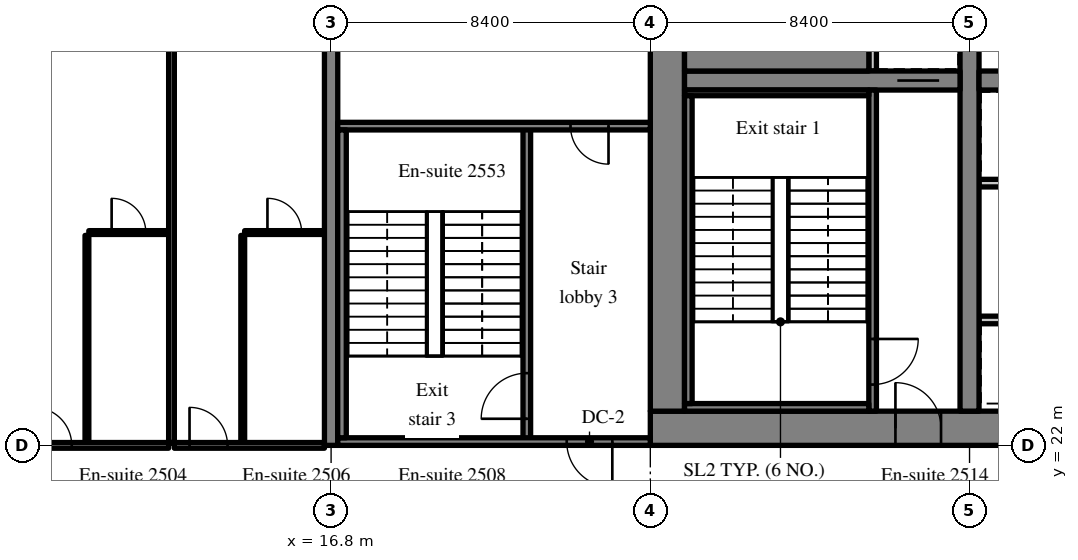
"""IFC4 building model, lengths in metres.
Left out: names, types, materials, properties, quantities, classifications, styles, units other than length and angle.
Written with IfcOpenShell. Run it as: python <this file> out.ifc"""

import sys

from ifc_helpers import new_model, si_unit, direction, frame, frame_2d, origin, place, context, subcontext, project, spatial, rectangle, extrude, source, transform, mapped, element, fill, save


model = new_model("IFC4")
c1 = context("Model", 3, precision=1e-05, world=origin(), true_north=direction((0.0, 1.0)))
c2 = subcontext(c1, "Body", "Model", "MODEL_VIEW")
j1 = project(units=[si_unit("LENGTHUNIT", "METRE"), si_unit("PLANEANGLEUNIT", "RADIAN")], contexts=[c1])
p1 = place(None, origin())
s1 = spatial("IfcSite", under=j1, at=p1, CompositionType="ELEMENT")
p2 = place(p1, origin())
s2 = spatial("IfcBuilding", under=s1, at=p2, CompositionType="ELEMENT")
p3 = place(p2, frame((0.0, 0.0, 106.6)))
s3 = spatial("IfcBuildingStorey", under=s2, at=p3, CompositionType="ELEMENT", Elevation=106.6)
m1 = source(origin(), c2, "Body", "SweptSolid", [
    extrude(rectangle(XDim=50.4, YDim=0.9, at=frame_2d((25.2, 0.0))), origin(), (0.0, 0.0, 1.0), 3.52),
])
p4 = place(p3, frame((25.2, 22.45, 0.0), z_axis=(0.0, 0.0, 1.0), x_axis=(1.0, 0.0, 0.0)))
e1 = element("IfcWall", 1, at=p4, inside=s3, PredefinedType="SHEAR", context=c2, shape_type="MappedRepresentation", body=[
    mapped(m1, transform((0.0, 0.0, 0.0), scale=1.0)),
])
m2 = source(origin(), c2, "Body", "SweptSolid", [
    extrude(rectangle(XDim=1.8, YDim=2.1, at=frame_2d((0.9, 1.05))), frame((0.0, 0.46, 0.0), z_axis=(0.0, -1.0, 0.0), x_axis=(1.0, 0.0, 0.0)), (0.0, 0.0, 1.0), 0.92),
])
p5 = place(p4, frame((15.9, 0.0, 0.0)))
e2 = element("IfcOpeningElement", 2, at=p5, cuts=e1, PredefinedType="OPENING", context=c2, shape_type="MappedRepresentation", body=[
    mapped(m2, transform((0.0, 0.0, 0.0), scale=1.0)),
])
m3 = source(origin(), c2, "Body", "SweptSolid", [
    extrude(rectangle(XDim=1.2, YDim=2.1, at=frame_2d((0.6, 1.05))), frame((0.0, 0.46, 0.0), z_axis=(0.0, -1.0, 0.0), x_axis=(1.0, 0.0, 0.0)), (0.0, 0.0, 1.0), 0.92),
])
p6 = place(p4, frame((26.975, 0.0, 0.0)))
e3 = element("IfcOpeningElement", 3, at=p6, cuts=e1, PredefinedType="OPENING", context=c2, shape_type="MappedRepresentation", body=[
    mapped(m3, transform((0.0, 0.0, 0.0), scale=1.0)),
])
m4 = source(origin(), c2, "Body", "SweptSolid", [
    extrude(rectangle(XDim=0.9, YDim=2.1, at=frame_2d((0.45, 1.05))), frame((0.0, 0.46, 0.0), z_axis=(0.0, -1.0, 0.0), x_axis=(1.0, 0.0, 0.0)), (0.0, 0.0, 1.0), 0.92),
])
p7 = place(p4, frame((32.25, 0.0, 0.0)))
e4 = element("IfcOpeningElement", 4, at=p7, cuts=e1, PredefinedType="OPENING", context=c2, shape_type="MappedRepresentation", body=[
    mapped(m4, transform((0.0, 0.0, 0.0), scale=1.0)),
])
p8 = place(p4, frame((38.275, 0.0, 0.0)))
e5 = element("IfcOpeningElement", 5, at=p8, cuts=e1, PredefinedType="OPENING", context=c2, shape_type="MappedRepresentation", body=[
    mapped(m4, transform((0.0, 0.0, 0.0), scale=1.0)),
])
p9 = place(p4, frame((6.45, 0.0, 0.0)))
e6 = element("IfcOpeningElement", 6, at=p9, cuts=e1, PredefinedType="OPENING", context=c2, shape_type="MappedRepresentation", body=[
    mapped(m3, transform((0.0, 0.0, 0.0), scale=1.0)),
])
p10 = place(p4, frame((47.775, 0.0, 0.0)))
e7 = element("IfcOpeningElement", 7, at=p10, cuts=e1, PredefinedType="OPENING", context=c2, shape_type="MappedRepresentation", body=[
    mapped(m3, transform((0.0, 0.0, 0.0), scale=1.0)),
])
m5 = source(origin(), c2, "Body", "SweptSolid", [
    extrude(rectangle(XDim=18.2, YDim=0.9, at=frame_2d((9.1, 0.0))), origin(), (0.0, 0.0, 1.0), 3.52),
])
p11 = place(p3, frame((25.65, 22.9, 0.0), z_axis=(0.0, 0.0, 1.0), x_axis=(0.0, 1.0, 0.0)))
e8 = element("IfcWall", 8, at=p11, inside=s3, PredefinedType="SHEAR", context=c2, shape_type="MappedRepresentation", body=[
    mapped(m5, transform((0.0, 0.0, 0.0), scale=1.0)),
])
m6 = source(origin(), c2, "Body", "SweptSolid", [
    extrude(rectangle(XDim=18.2, YDim=0.5, at=frame_2d((9.1, 0.0))), origin(), (0.0, 0.0, 1.0), 3.52),
])
p12 = place(p3, frame((33.6, 22.9, 0.0), z_axis=(0.0, 0.0, 1.0), x_axis=(0.0, 1.0, 0.0)))
e9 = element("IfcWall", 9, at=p12, inside=s3, PredefinedType="SHEAR", context=c2, shape_type="MappedRepresentation", body=[
    mapped(m6, transform((0.0, 0.0, 0.0), scale=1.0)),
])
m7 = source(origin(), c2, "Body", "SweptSolid", [
    extrude(rectangle(XDim=1.1, YDim=2.1, at=frame_2d((0.55, 1.05))), frame((0.0, 0.26, 0.0), z_axis=(0.0, -1.0, 0.0), x_axis=(1.0, 0.0, 0.0)), (0.0, 0.0, 1.0), 0.52),
])
p13 = place(p12, frame((12.55, 0.0, 0.0)))
e10 = element("IfcOpeningElement", 10, at=p13, cuts=e9, PredefinedType="OPENING", context=c2, shape_type="MappedRepresentation", body=[
    mapped(m7, transform((0.0, 0.0, 0.0), scale=1.0)),
])
m8 = source(origin(), c2, "Body", "SweptSolid", [
    extrude(rectangle(XDim=7.25, YDim=0.5, at=frame_2d((3.625, 0.0))), origin(), (0.0, 0.0, 1.0), 3.52),
])
p14 = place(p3, frame((26.1, 31.6, 0.0), z_axis=(0.0, 0.0, 1.0), x_axis=(1.0, 0.0, 0.0)))
e11 = element("IfcWall", 11, at=p14, inside=s3, PredefinedType="SHEAR", context=c2, shape_type="MappedRepresentation", body=[
    mapped(m8, transform((0.0, 0.0, 0.0), scale=1.0)),
])
p15 = place(p14, frame((5.6, 0.0, 0.0)))
e12 = element("IfcOpeningElement", 12, at=p15, cuts=e11, PredefinedType="OPENING", context=c2, shape_type="MappedRepresentation", body=[
    mapped(m7, transform((0.0, 0.0, 0.0), scale=1.0)),
])
m9 = source(origin(), c2, "Body", "SweptSolid", [
    extrude(rectangle(XDim=16.3, YDim=0.5, at=frame_2d((8.15, 0.0))), origin(), (0.0, 0.0, 1.0), 3.52),
])
p16 = place(p3, frame((33.85, 31.6, 0.0), z_axis=(0.0, 0.0, 1.0), x_axis=(1.0, 0.0, 0.0)))
e13 = element("IfcWall", 13, at=p16, inside=s3, PredefinedType="SHEAR", context=c2, shape_type="MappedRepresentation", body=[
    mapped(m9, transform((0.0, 0.0, 0.0), scale=1.0)),
])
m10 = source(origin(), c2, "Body", "SweptSolid", [
    extrude(rectangle(XDim=1.0, YDim=2.1, at=frame_2d((0.5, 1.05))), frame((0.0, 0.26, 0.0), z_axis=(0.0, -1.0, 0.0), x_axis=(1.0, 0.0, 0.0)), (0.0, 0.0, 1.0), 0.52),
])
p17 = place(p16, frame((14.725, 0.0, 0.0)))
e14 = element("IfcOpeningElement", 14, at=p17, cuts=e13, PredefinedType="OPENING", context=c2, shape_type="MappedRepresentation", body=[
    mapped(m10, transform((0.0, 0.0, 0.0), scale=1.0)),
])
m11 = source(origin(), c2, "Body", "SweptSolid", [
    extrude(rectangle(XDim=20.0, YDim=0.35, at=frame_2d((10.0, 0.0))), origin(), (0.0, 0.0, 1.0), 3.52),
])
p18 = place(p3, frame((16.8, 22.0, 0.0), z_axis=(0.0, 0.0, 1.0), x_axis=(0.0, 1.0, 0.0)))
e15 = element("IfcWall", 15, at=p18, inside=s3, PredefinedType="SHEAR", context=c2, shape_type="MappedRepresentation", body=[
    mapped(m11, transform((0.0, 0.0, 0.0), scale=1.0)),
])
m12 = source(origin(), c2, "Body", "SweptSolid", [
    extrude(rectangle(XDim=6.05, YDim=0.2, at=frame_2d((3.025, 0.0))), origin(), (0.0, 0.0, 1.0), 3.52),
])
p19 = place(p3, frame((33.85, 25.3, 0.0), z_axis=(0.0, 0.0, 1.0), x_axis=(1.0, 0.0, 0.0)))
e16 = element("IfcWall", 16, at=p19, inside=s3, PredefinedType="SOLIDWALL", context=c2, shape_type="MappedRepresentation", body=[
    mapped(m12, transform((0.0, 0.0, 0.0), scale=1.0)),
])
m13 = source(origin(), c2, "Body", "SweptSolid", [
    extrude(rectangle(XDim=1.1, YDim=2.1, at=frame_2d((0.55, 1.05))), frame((0.0, 0.11, 0.0), z_axis=(0.0, -1.0, 0.0), x_axis=(1.0, 0.0, 0.0)), (0.0, 0.0, 1.0), 0.22),
])
p20 = place(p19, frame((1.0, 0.0, 0.0)))
e17 = element("IfcOpeningElement", 17, at=p20, cuts=e16, PredefinedType="OPENING", context=c2, shape_type="MappedRepresentation", body=[
    mapped(m13, transform((0.0, 0.0, 0.0), scale=1.0)),
])
p21 = place(p19, frame((4.0, 0.0, 0.0)))
e18 = element("IfcOpeningElement", 18, at=p21, cuts=e16, PredefinedType="OPENING", context=c2, shape_type="MappedRepresentation", body=[
    mapped(m13, transform((0.0, 0.0, 0.0), scale=1.0)),
])
m14 = source(origin(), c2, "Body", "SweptSolid", [
    extrude(rectangle(XDim=12.05, YDim=0.2, at=frame_2d((6.025, 0.0))), origin(), (0.0, 0.0, 1.0), 3.52),
])
p22 = place(p3, frame((33.85, 28.9, 0.0), z_axis=(0.0, 0.0, 1.0), x_axis=(1.0, 0.0, 0.0)))
e19 = element("IfcWall", 19, at=p22, inside=s3, PredefinedType="SOLIDWALL", context=c2, shape_type="MappedRepresentation", body=[
    mapped(m14, transform((0.0, 0.0, 0.0), scale=1.0)),
])
p23 = place(p22, frame((1.0, 0.0, 0.0)))
e20 = element("IfcOpeningElement", 20, at=p23, cuts=e19, PredefinedType="OPENING", context=c2, shape_type="MappedRepresentation", body=[
    mapped(m13, transform((0.0, 0.0, 0.0), scale=1.0)),
])
p24 = place(p22, frame((4.0, 0.0, 0.0)))
e21 = element("IfcOpeningElement", 21, at=p24, cuts=e19, PredefinedType="OPENING", context=c2, shape_type="MappedRepresentation", body=[
    mapped(m13, transform((0.0, 0.0, 0.0), scale=1.0)),
])
p25 = place(p22, frame((7.0, 0.0, 0.0)))
e22 = element("IfcOpeningElement", 22, at=p25, cuts=e19, PredefinedType="OPENING", context=c2, shape_type="MappedRepresentation", body=[
    mapped(m13, transform((0.0, 0.0, 0.0), scale=1.0)),
])
p26 = place(p22, frame((10.0, 0.0, 0.0)))
e23 = element("IfcOpeningElement", 23, at=p26, cuts=e19, PredefinedType="OPENING", context=c2, shape_type="MappedRepresentation", body=[
    mapped(m13, transform((0.0, 0.0, 0.0), scale=1.0)),
])
m15 = source(origin(), c2, "Body", "SweptSolid", [
    extrude(rectangle(XDim=8.45, YDim=0.2, at=frame_2d((4.225, 0.0))), origin(), (0.0, 0.0, 1.0), 3.52),
])
p27 = place(p3, frame((31.05, 22.9, 0.0), z_axis=(0.0, 0.0, 1.0), x_axis=(0.0, 1.0, 0.0)))
e24 = element("IfcWall", 24, at=p27, inside=s3, PredefinedType="SOLIDWALL", context=c2, shape_type="MappedRepresentation", body=[
    mapped(m15, transform((0.0, 0.0, 0.0), scale=1.0)),
])
m16 = source(origin(), c2, "Body", "SweptSolid", [
    extrude(rectangle(XDim=1.2, YDim=2.1, at=frame_2d((0.6, 1.05))), frame((0.0, 0.11, 0.0), z_axis=(0.0, -1.0, 0.0), x_axis=(1.0, 0.0, 0.0)), (0.0, 0.0, 1.0), 0.22),
])
p28 = place(p27, frame((0.7, 0.0, 0.0)))
e25 = element("IfcOpeningElement", 25, at=p28, cuts=e24, PredefinedType="OPENING", context=c2, shape_type="MappedRepresentation", body=[
    mapped(m16, transform((0.0, 0.0, 0.0), scale=1.0)),
])
m17 = source(origin(), c2, "Body", "SweptSolid", [
    extrude(rectangle(XDim=1.75, YDim=0.2, at=frame_2d((0.875, 0.0))), origin(), (0.0, 0.0, 1.0), 3.52),
])
p29 = place(p3, frame((31.05, 31.85, 0.0), z_axis=(0.0, 0.0, 1.0), x_axis=(0.0, 1.0, 0.0)))
e26 = element("IfcWall", 26, at=p29, inside=s3, PredefinedType="SOLIDWALL", context=c2, shape_type="MappedRepresentation", body=[
    mapped(m17, transform((0.0, 0.0, 0.0), scale=1.0)),
])
m18 = source(origin(), c2, "Body", "SweptSolid", [
    extrude(rectangle(XDim=8.3, YDim=0.2, at=frame_2d((4.15, 0.0))), origin(), (0.0, 0.0, 1.0), 3.52),
])
p30 = place(p3, frame((21.95, 22.1, 0.0), z_axis=(0.0, 0.0, 1.0), x_axis=(0.0, 1.0, 0.0)))
e27 = element("IfcWall", 27, at=p30, inside=s3, PredefinedType="SOLIDWALL", context=c2, shape_type="MappedRepresentation", body=[
    mapped(m18, transform((0.0, 0.0, 0.0), scale=1.0)),
])
p31 = place(p30, frame((0.6, 0.0, 0.0)))
e28 = element("IfcOpeningElement", 28, at=p31, cuts=e27, PredefinedType="OPENING", context=c2, shape_type="MappedRepresentation", body=[
    mapped(m16, transform((0.0, 0.0, 0.0), scale=1.0)),
])
m19 = source(origin(), c2, "Body", "SweptSolid", [
    extrude(rectangle(XDim=8.225, YDim=0.2, at=frame_2d((4.112, 0.0))), origin(), (0.0, 0.0, 1.0), 3.52),
])
p32 = place(p3, frame((16.975, 22.1, 0.0), z_axis=(0.0, 0.0, 1.0), x_axis=(1.0, 0.0, 0.0)))
e29 = element("IfcWall", 29, at=p32, inside=s3, PredefinedType="SOLIDWALL", context=c2, shape_type="MappedRepresentation", body=[
    mapped(m19, transform((0.0, 0.0, 0.0), scale=1.0)),
])
p33 = place(p32, frame((6.025, 0.0, 0.0)))
e30 = element("IfcOpeningElement", 30, at=p33, cuts=e29, PredefinedType="OPENING", context=c2, shape_type="MappedRepresentation", body=[
    mapped(m16, transform((0.0, 0.0, 0.0), scale=1.0)),
])
p34 = place(p3, frame((16.975, 30.4, 0.0), z_axis=(0.0, 0.0, 1.0), x_axis=(1.0, 0.0, 0.0)))
e31 = element("IfcWall", 31, at=p34, inside=s3, PredefinedType="SOLIDWALL", context=c2, shape_type="MappedRepresentation", body=[
    mapped(m19, transform((0.0, 0.0, 0.0), scale=1.0)),
])
m20 = source(origin(), c2, "Body", "SweptSolid", [
    extrude(rectangle(XDim=1.0, YDim=2.1, at=frame_2d((0.5, 1.05))), frame((0.0, 0.11, 0.0), z_axis=(0.0, -1.0, 0.0), x_axis=(1.0, 0.0, 0.0)), (0.0, 0.0, 1.0), 0.22),
])
p35 = place(p34, frame((6.125, 0.0, 0.0)))
e32 = element("IfcOpeningElement", 32, at=p35, cuts=e31, PredefinedType="OPENING", context=c2, shape_type="MappedRepresentation", body=[
    mapped(m20, transform((0.0, 0.0, 0.0), scale=1.0)),
])
m21 = source(origin(), c2, "Body", "SweptSolid", [
    extrude(rectangle(XDim=4.85, YDim=0.2, at=frame_2d((2.425, 0.0))), origin(), (0.0, 0.0, 1.0), 3.52),
])
p36 = place(p3, frame((26.1, 23.0, 0.0), z_axis=(0.0, 0.0, 1.0), x_axis=(1.0, 0.0, 0.0)))
e33 = element("IfcWall", 33, at=p36, inside=s3, PredefinedType="SOLIDWALL", context=c2, shape_type="MappedRepresentation", body=[
    mapped(m21, transform((0.0, 0.0, 0.0), scale=1.0)),
])
m22 = source(origin(), c2, "Body", "SweptSolid", [
    extrude(rectangle(XDim=4.85, YDim=0.15, at=frame_2d((2.425, 0.0))), origin(), (0.0, 0.0, 1.0), 3.52),
])
p37 = place(p3, frame((26.1, 31.275, 0.0), z_axis=(0.0, 0.0, 1.0), x_axis=(1.0, 0.0, 0.0)))
e34 = element("IfcWall", 34, at=p37, inside=s3, PredefinedType="SOLIDWALL", context=c2, shape_type="MappedRepresentation", body=[
    mapped(m22, transform((0.0, 0.0, 0.0), scale=1.0)),
])
m23 = source(origin(), c2, "Body", "SweptSolid", [
    extrude(rectangle(XDim=8.1, YDim=0.2, at=frame_2d((4.05, 0.0))), origin(), (0.0, 0.0, 1.0), 3.52),
])
p38 = place(p3, frame((26.2, 23.1, 0.0), z_axis=(0.0, 0.0, 1.0), x_axis=(0.0, 1.0, 0.0)))
e35 = element("IfcWall", 35, at=p38, inside=s3, PredefinedType="SOLIDWALL", context=c2, shape_type="MappedRepresentation", body=[
    mapped(m23, transform((0.0, 0.0, 0.0), scale=1.0)),
])
m24 = source(origin(), c2, "Body", "SweptSolid", [
    extrude(rectangle(XDim=8.1, YDim=0.225, at=frame_2d((4.05, 0.0))), origin(), (0.0, 0.0, 1.0), 3.52),
])
p39 = place(p3, frame((17.087, 22.2, 0.0), z_axis=(0.0, 0.0, 1.0), x_axis=(0.0, 1.0, 0.0)))
e36 = element("IfcWall", 36, at=p39, inside=s3, PredefinedType="SOLIDWALL", context=c2, shape_type="MappedRepresentation", body=[
    mapped(m24, transform((0.0, 0.0, 0.0), scale=1.0)),
])
m25 = source(origin(), c2, "Body", "SweptSolid", [
    extrude(rectangle(XDim=4.85, YDim=0.95, at=frame_2d((2.425, 0.0))), origin(), (0.0, 0.0, 1.0), 3.52),
])
p40 = place(p3, frame((26.1, 32.325, 0.0), z_axis=(0.0, 0.0, 1.0), x_axis=(1.0, 0.0, 0.0)))
e37 = element("IfcWall", 37, at=p40, inside=s3, PredefinedType="SOLIDWALL", context=c2, shape_type="MappedRepresentation", body=[
    mapped(m25, transform((0.0, 0.0, 0.0), scale=1.0)),
])
m26 = source(origin(), c2, "Body", "SweptSolid", [
    extrude(rectangle(XDim=5.45, YDim=0.1, at=frame_2d((2.725, 0.0))), origin(), (0.0, 0.0, 1.0), 3.52),
])
p41 = place(p3, frame((10.375, 22.075, 0.0), z_axis=(0.0, 0.0, 1.0), x_axis=(0.0, 1.0, 0.0)))
e38 = element("IfcWall", 38, at=p41, inside=s3, PredefinedType="PARTITIONING", context=c2, shape_type="MappedRepresentation", body=[
    mapped(m26, transform((0.0, 0.0, 0.0), scale=1.0)),
])
m27 = source(origin(), c2, "Body", "SweptSolid", [
    extrude(rectangle(XDim=2.1, YDim=0.1, at=frame_2d((1.05, 0.0))), origin(), (0.0, 0.0, 1.0), 3.52),
])
p42 = place(p3, frame((10.425, 27.6, 0.0), z_axis=(0.0, 0.0, 1.0), x_axis=(1.0, 0.0, 0.0)))
e39 = element("IfcWall", 39, at=p42, inside=s3, PredefinedType="PARTITIONING", context=c2, shape_type="MappedRepresentation", body=[
    mapped(m27, transform((0.0, 0.0, 0.0), scale=1.0)),
])
m28 = source(origin(), c2, "Body", "SweptSolid", [
    extrude(rectangle(XDim=0.9, YDim=2.1, at=frame_2d((0.45, 1.05))), frame((0.0, 0.06, 0.0), z_axis=(0.0, -1.0, 0.0), x_axis=(1.0, 0.0, 0.0)), (0.0, 0.0, 1.0), 0.12),
])
p43 = place(p42, frame((0.6, 0.0, 0.0)))
e40 = element("IfcOpeningElement", 40, at=p43, cuts=e39, PredefinedType="OPENING", context=c2, shape_type="MappedRepresentation", body=[
    mapped(m28, transform((0.0, 0.0, 0.0), scale=1.0)),
])
m29 = source(origin(), c2, "Body", "SweptSolid", [
    extrude(rectangle(XDim=3.95, YDim=0.15, at=frame_2d((1.975, 0.0))), origin(), (0.0, 0.0, 1.0), 2.82),
])
p44 = place(p3, frame((8.575, 22.0, 0.0), z_axis=(0.0, 0.0, 1.0), x_axis=(1.0, 0.0, 0.0)))
e41 = element("IfcWall", 41, at=p44, inside=s3, PredefinedType="PARTITIONING", context=c2, shape_type="MappedRepresentation", body=[
    mapped(m29, transform((0.0, 0.0, 0.0), scale=1.0)),
])
m30 = source(origin(), c2, "Body", "SweptSolid", [
    extrude(rectangle(XDim=1.0, YDim=2.1, at=frame_2d((0.5, 1.05))), frame((0.0, 0.085, 0.0), z_axis=(0.0, -1.0, 0.0), x_axis=(1.0, 0.0, 0.0)), (0.0, 0.0, 1.0), 0.17),
])
p45 = place(p44, frame((0.4, 0.0, 0.0)))
e42 = element("IfcOpeningElement", 42, at=p45, cuts=e41, PredefinedType="OPENING", context=c2, shape_type="MappedRepresentation", body=[
    mapped(m30, transform((0.0, 0.0, 0.0), scale=1.0)),
])
p46 = place(p3, frame((14.475, 22.075, 0.0), z_axis=(0.0, 0.0, 1.0), x_axis=(0.0, 1.0, 0.0)))
e43 = element("IfcWall", 43, at=p46, inside=s3, PredefinedType="PARTITIONING", context=c2, shape_type="MappedRepresentation", body=[
    mapped(m26, transform((0.0, 0.0, 0.0), scale=1.0)),
])
m31 = source(origin(), c2, "Body", "SweptSolid", [
    extrude(rectangle(XDim=2.1, YDim=0.1, at=frame_2d((1.05, 0.0))), origin(), (0.0, 0.0, 1.0), 3.52),
])
p47 = place(p3, frame((14.525, 27.6, 0.0), z_axis=(0.0, 0.0, 1.0), x_axis=(1.0, 0.0, 0.0)))
e44 = element("IfcWall", 44, at=p47, inside=s3, PredefinedType="PARTITIONING", context=c2, shape_type="MappedRepresentation", body=[
    mapped(m31, transform((0.0, 0.0, 0.0), scale=1.0)),
])
p48 = place(p47, frame((0.6, 0.0, 0.0)))
e45 = element("IfcOpeningElement", 45, at=p48, cuts=e44, PredefinedType="OPENING", context=c2, shape_type="MappedRepresentation", body=[
    mapped(m28, transform((0.0, 0.0, 0.0), scale=1.0)),
])
p49 = place(p3, frame((12.675, 22.0, 0.0), z_axis=(0.0, 0.0, 1.0), x_axis=(1.0, 0.0, 0.0)))
e46 = element("IfcWall", 46, at=p49, inside=s3, PredefinedType="PARTITIONING", context=c2, shape_type="MappedRepresentation", body=[
    mapped(m29, transform((0.0, 0.0, 0.0), scale=1.0)),
])
p50 = place(p49, frame((0.4, 0.0, 0.0)))
e47 = element("IfcOpeningElement", 47, at=p50, cuts=e46, PredefinedType="OPENING", context=c2, shape_type="MappedRepresentation", body=[
    mapped(m30, transform((0.0, 0.0, 0.0), scale=1.0)),
])
m32 = source(origin(), c2, "Body", "SweptSolid", [
    extrude(rectangle(XDim=19.225, YDim=0.15, at=frame_2d((9.613, 0.0))), origin(), (0.0, 0.0, 1.0), 3.52),
])
p51 = place(p3, frame((12.6, 22.075, 0.0), z_axis=(0.0, 0.0, 1.0), x_axis=(0.0, 1.0, 0.0)))
e48 = element("IfcWall", 48, at=p51, inside=s3, PredefinedType="PARTITIONING", context=c2, shape_type="MappedRepresentation", body=[
    mapped(m32, transform((0.0, 0.0, 0.0), scale=1.0)),
])
m33 = source(origin(), c2, "Body", "SweptSolid", [
    extrude(rectangle(XDim=1.2, YDim=2.1, at=frame_2d((0.6, 1.05))), frame((0.0, 0.025, 0.0), z_axis=(0.0, -1.0, 0.0), x_axis=(1.0, 0.0, 0.0)), (0.0, 0.0, 1.0), 0.05),
])
p52 = place(p28, origin())
e49 = element("IfcDoor", 49, at=p52, inside=s3, OperationType="SINGLE_SWING_RIGHT", PredefinedType="DOOR", context=c2, shape_type="MappedRepresentation", body=[
    mapped(m33, transform((0.0, 0.0, 0.0), scale=1.0)),
])
fill(e25, e49)
m34 = source(origin(), c2, "Body", "SweptSolid", [
    extrude(rectangle(XDim=1.2, YDim=2.1, at=frame_2d((0.6, 1.05))), frame((0.0, 0.375, 0.0), z_axis=(0.0, -1.0, 0.0), x_axis=(1.0, 0.0, 0.0)), (0.0, 0.0, 1.0), 0.05),
])
p53 = place(p9, origin())
e50 = element("IfcDoor", 50, at=p53, inside=s3, OperationType="SINGLE_SWING_LEFT", PredefinedType="DOOR", context=c2, shape_type="MappedRepresentation", body=[
    mapped(m34, transform((0.0, 0.0, 0.0), scale=1.0)),
])
fill(e6, e50)
m35 = source(origin(), c2, "Body", "SweptSolid", [
    extrude(rectangle(XDim=1.1, YDim=2.1, at=frame_2d((0.55, 1.05))), frame((0.0, 0.025, 0.0), z_axis=(0.0, -1.0, 0.0), x_axis=(1.0, 0.0, 0.0)), (0.0, 0.0, 1.0), 0.05),
])
p54 = place(p15, origin())
e51 = element("IfcDoor", 51, at=p54, inside=s3, OperationType="SLIDING_TO_RIGHT", PredefinedType="DOOR", context=c2, shape_type="MappedRepresentation", body=[
    mapped(m35, transform((0.0, 0.0, 0.0), scale=1.0)),
])
fill(e12, e51)
p55 = place(p31, origin())
e52 = element("IfcDoor", 52, at=p55, inside=s3, OperationType="SINGLE_SWING_LEFT", PredefinedType="DOOR", context=c2, shape_type="MappedRepresentation", body=[
    mapped(m33, transform((0.0, 0.0, 0.0), scale=1.0)),
])
fill(e28, e52)
p56 = place(p33, origin())
e53 = element("IfcDoor", 53, at=p56, inside=s3, OperationType="SINGLE_SWING_RIGHT", PredefinedType="DOOR", context=c2, shape_type="MappedRepresentation", body=[
    mapped(m33, transform((0.0, 0.0, 0.0), scale=1.0)),
])
fill(e30, e53)
m36 = source(origin(), c2, "Body", "SweptSolid", [
    extrude(rectangle(XDim=1.0, YDim=2.1, at=frame_2d((0.5, 1.05))), frame((0.0, 0.025, 0.0), z_axis=(0.0, -1.0, 0.0), x_axis=(1.0, 0.0, 0.0)), (0.0, 0.0, 1.0), 0.05),
])
p57 = place(p35, origin())
e54 = element("IfcDoor", 54, at=p57, inside=s3, OperationType="SINGLE_SWING_RIGHT", PredefinedType="DOOR", context=c2, shape_type="MappedRepresentation", body=[
    mapped(m36, transform((0.0, 0.0, 0.0), scale=1.0)),
])
fill(e32, e54)
m37 = source(origin(), c2, "Body", "SweptSolid", [
    extrude(rectangle(XDim=0.9, YDim=2.1, at=frame_2d((0.45, 1.05))), frame((0.0, 0.025, 0.0), z_axis=(0.0, -1.0, 0.0), x_axis=(1.0, 0.0, 0.0)), (0.0, 0.0, 1.0), 0.05),
])
p58 = place(p43, origin())
e55 = element("IfcDoor", 55, at=p58, inside=s3, OperationType="SINGLE_SWING_LEFT", PredefinedType="DOOR", context=c2, shape_type="MappedRepresentation", body=[
    mapped(m37, transform((0.0, 0.0, 0.0), scale=1.0)),
])
fill(e40, e55)
p59 = place(p45, origin())
e56 = element("IfcDoor", 56, at=p59, inside=s3, OperationType="SINGLE_SWING_LEFT", PredefinedType="DOOR", context=c2, shape_type="MappedRepresentation", body=[
    mapped(m36, transform((0.0, 0.0, 0.0), scale=1.0)),
])
fill(e42, e56)
p60 = place(p48, origin())
e57 = element("IfcDoor", 57, at=p60, inside=s3, OperationType="SINGLE_SWING_LEFT", PredefinedType="DOOR", context=c2, shape_type="MappedRepresentation", body=[
    mapped(m37, transform((0.0, 0.0, 0.0), scale=1.0)),
])
fill(e45, e57)
p61 = place(p50, origin())
e58 = element("IfcDoor", 58, at=p61, inside=s3, OperationType="SINGLE_SWING_LEFT", PredefinedType="DOOR", context=c2, shape_type="MappedRepresentation", body=[
    mapped(m36, transform((0.0, 0.0, 0.0), scale=1.0)),
])
fill(e47, e58)
save(model, sys.argv[1])
